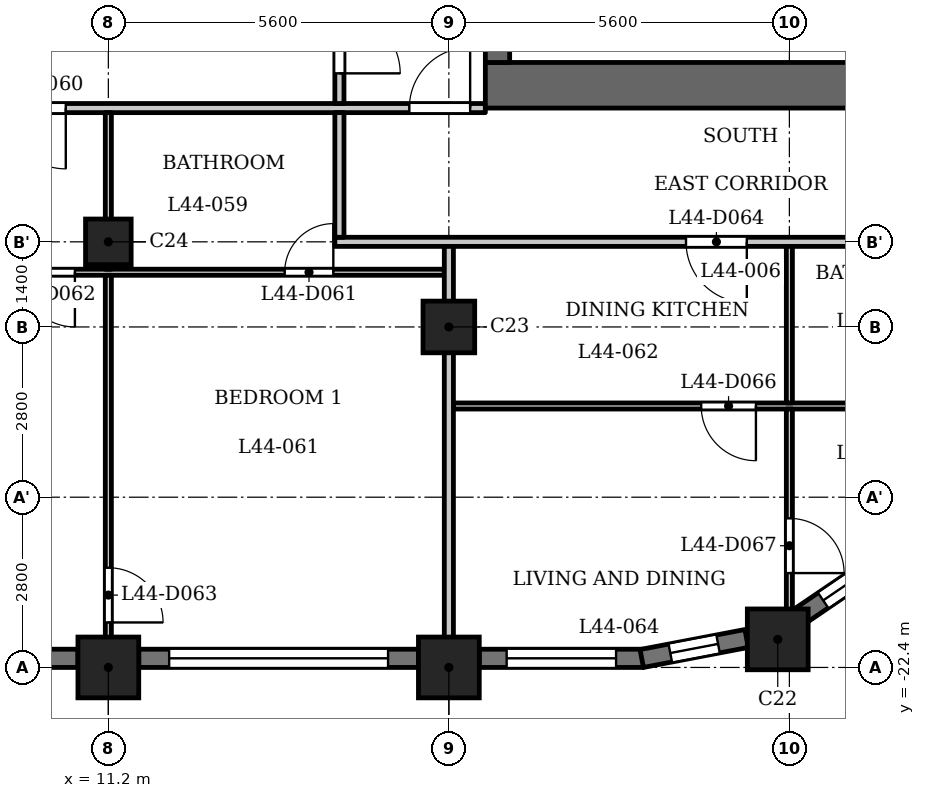
"""IFC4 building model, lengths in metres.
Left out: names, types, materials, properties, quantities, classifications, styles, units other than length and angle.
Written with IfcOpenShell. Run it as: python <this file> out.ifc"""

import sys

from ifc_helpers import new_model, si_unit, direction, frame, frame_2d, origin, origin_2d, place, context, subcontext, project, spatial, rectangle, extrude, element, fill, save


model = new_model("IFC4")
c1 = context("Model", 3, precision=1e-05, world=origin(), true_north=direction((0.0, 1.0)))
c2 = subcontext(c1, "Body", "Model", "MODEL_VIEW")
j1 = project(units=[si_unit("LENGTHUNIT", "METRE"), si_unit("PLANEANGLEUNIT", "RADIAN")], contexts=[c1])
p1 = place(None, origin())
s1 = spatial("IfcSite", under=j1, at=p1, CompositionType="ELEMENT")
p2 = place(p1, origin())
s2 = spatial("IfcBuilding", under=s1, at=p2, CompositionType="ELEMENT")
p3 = place(p2, frame((0.0, 0.0, 171.1)))
s3 = spatial("IfcBuildingStorey", under=s2, at=p3, CompositionType="ELEMENT", Elevation=171.1)
for number, where, z_axis, x_axis in (
    (1, (11.2, -22.4, 0.0), (0.0, 0.0, 1.0), (1.0, 0.0, 0.0)),
    (2, (16.8, -22.4, 0.0), (0.0, 0.0, 1.0), (1.0, 0.0, 0.0)),
    (3, (22.209, -21.938, 0.0), (0.0, 0.0, 1.0), (1.0, 0.0, 0.0)),
):
    element("IfcColumn", number, at=place(p3, frame(where, z_axis=z_axis, x_axis=x_axis)), inside=s3, PredefinedType="COLUMN", context=c2, shape_type="SweptSolid", body=[
        extrude(rectangle(XDim=1.0, YDim=1.0, at=origin_2d()), origin(), (0.0, 0.0, 1.0), 3.5),
    ])
p4 = place(p3, frame((16.8, -16.8, 0.0), z_axis=(0.0, 0.0, 1.0), x_axis=(1.0, 0.0, 0.0)))
e4 = element("IfcColumn", 4, at=p4, inside=s3, PredefinedType="COLUMN", context=c2, shape_type="SweptSolid", body=[
    extrude(rectangle(XDim=0.85, YDim=0.85, at=origin_2d()), origin(), (0.0, 0.0, 1.0), 3.5),
])
p5 = place(p3, frame((11.2, -15.4, 0.0), z_axis=(0.0, 0.0, 1.0), x_axis=(1.0, 0.0, 0.0)))
e5 = element("IfcColumn", 5, at=p5, inside=s3, PredefinedType="COLUMN", context=c2, shape_type="SweptSolid", body=[
    extrude(rectangle(XDim=0.75, YDim=0.75, at=origin_2d()), origin(), (0.0, 0.0, 1.0), 3.5),
])
p6 = place(p3, frame((6.1, -22.25, 0.0), z_axis=(0.0, 0.0, 1.0), x_axis=(1.0, 0.0, 0.0)))
e6 = element("IfcWall", 6, at=p6, inside=s3, PredefinedType="SOLIDWALL", context=c2, shape_type="SweptSolid", body=[
    extrude(rectangle(XDim=4.6, YDim=0.3, at=frame_2d((2.3, 0.0))), origin(), (0.0, 0.0, 1.0), 2.45),
])
p7 = place(p6, frame((0.5, 0.0, 1.2)))
e7 = element("IfcOpeningElement", 7, at=p7, cuts=e6, PredefinedType="OPENING", context=c2, shape_type="SweptSolid", body=[
    extrude(rectangle(XDim=3.6, YDim=0.95, at=frame_2d((1.8, 0.475))), frame((0.0, 0.16, 0.0), z_axis=(0.0, -1.0, 0.0), x_axis=(1.0, 0.0, 0.0)), (0.0, 0.0, 1.0), 0.32),
])
p8 = place(p3, frame((11.7, -22.25, 0.0), z_axis=(0.0, 0.0, 1.0), x_axis=(1.0, 0.0, 0.0)))
e8 = element("IfcWall", 8, at=p8, inside=s3, PredefinedType="SOLIDWALL", context=c2, shape_type="SweptSolid", body=[
    extrude(rectangle(XDim=4.6, YDim=0.3, at=frame_2d((2.3, 0.0))), origin(), (0.0, 0.0, 1.0), 2.45),
])
p9 = place(p8, frame((0.5, 0.0, 1.2)))
e9 = element("IfcOpeningElement", 9, at=p9, cuts=e8, PredefinedType="OPENING", context=c2, shape_type="SweptSolid", body=[
    extrude(rectangle(XDim=3.6, YDim=0.95, at=frame_2d((1.8, 0.475))), frame((0.0, 0.16, 0.0), z_axis=(0.0, -1.0, 0.0), x_axis=(1.0, 0.0, 0.0)), (0.0, 0.0, 1.0), 0.32),
])
p10 = place(p3, frame((17.3, -22.25, 0.0), z_axis=(0.0, 0.0, 1.0), x_axis=(1.0, 0.0, 0.0)))
e10 = element("IfcWall", 10, at=p10, inside=s3, PredefinedType="SOLIDWALL", context=c2, shape_type="SweptSolid", body=[
    extrude(rectangle(XDim=2.7, YDim=0.3, at=frame_2d((1.35, 0.0))), origin(), (0.0, 0.0, 1.0), 2.45),
])
p11 = place(p10, frame((0.45, 0.0, 0.9)))
e11 = element("IfcOpeningElement", 11, at=p11, cuts=e10, PredefinedType="OPENING", context=c2, shape_type="SweptSolid", body=[
    extrude(rectangle(XDim=1.8, YDim=1.25, at=frame_2d((0.9, 0.625))), frame((0.0, 0.16, 0.0), z_axis=(0.0, -1.0, 0.0), x_axis=(1.0, 0.0, 0.0)), (0.0, 0.0, 1.0), 0.32),
])
p12 = place(p3, frame((19.972, -22.253, 0.0), z_axis=(0.0, 0.0, 1.0), x_axis=(0.982284988433, 0.187393173565, 0.0)))
e12 = element("IfcWall", 12, at=p12, inside=s3, PredefinedType="SOLIDWALL", context=c2, shape_type="SweptSolid", body=[
    extrude(rectangle(XDim=1.756, YDim=0.3, at=frame_2d((0.878, 0.0))), origin(), (0.0, 0.0, 1.0), 2.45),
])
p13 = place(p12, frame((0.478, 0.0, 0.6)))
e13 = element("IfcOpeningElement", 13, at=p13, cuts=e12, PredefinedType="OPENING", context=c2, shape_type="SweptSolid", body=[
    extrude(rectangle(XDim=0.8, YDim=1.55, at=frame_2d((0.4, 0.775))), frame((0.0, 0.16, 0.0), z_axis=(0.0, -1.0, 0.0), x_axis=(1.0, 0.0, 0.0)), (0.0, 0.0, 1.0), 0.32),
])
p14 = place(p3, frame((22.56, -21.566, 0.0), z_axis=(0.0, 0.0, 1.0), x_axis=(0.82707645233, 0.562089443061, 0.0)))
e14 = element("IfcWall", 14, at=p14, inside=s3, PredefinedType="SOLIDWALL", context=c2, shape_type="SweptSolid", body=[
    extrude(rectangle(XDim=1.756, YDim=0.3, at=frame_2d((0.878, 0.0))), origin(), (0.0, 0.0, 1.0), 2.45),
])
p15 = place(p14, frame((0.478, 0.0, 0.6)))
e15 = element("IfcOpeningElement", 15, at=p15, cuts=e14, PredefinedType="OPENING", context=c2, shape_type="SweptSolid", body=[
    extrude(rectangle(XDim=0.8, YDim=1.55, at=frame_2d((0.4, 0.775))), frame((0.0, 0.16, 0.0), z_axis=(0.0, -1.0, 0.0), x_axis=(1.0, 0.0, 0.0)), (0.0, 0.0, 1.0), 0.32),
])
p16 = place(p3, frame((17.4, -12.825, 0.0), z_axis=(0.0, 0.0, 1.0), x_axis=(1.0, 0.0, 0.0)))
e16 = element("IfcWall", 16, at=p16, inside=s3, PredefinedType="SHEAR", context=c2, shape_type="SweptSolid", body=[
    extrude(rectangle(XDim=10.4, YDim=0.75, at=frame_2d((5.2, 0.0))), origin(), (0.0, 0.0, 1.0), 3.2),
])
p17 = place(p3, frame((17.6, -12.45, 0.0), z_axis=(0.0, 0.0, 1.0), x_axis=(0.0, 1.0, 0.0)))
e17 = element("IfcWall", 17, at=p17, inside=s3, PredefinedType="SHEAR", context=c2, shape_type="SweptSolid", body=[
    extrude(rectangle(XDim=24.9, YDim=0.4, at=frame_2d((12.45, 0.0))), origin(), (0.0, 0.0, 1.0), 3.2),
])
p18 = place(p17, frame((8.65, 0.0, 0.0)))
e18 = element("IfcOpeningElement", 18, at=p18, cuts=e17, PredefinedType="OPENING", context=c2, shape_type="SweptSolid", body=[
    extrude(rectangle(XDim=0.9, YDim=2.1, at=frame_2d((0.45, 1.05))), frame((0.0, 0.21, 0.0), z_axis=(0.0, -1.0, 0.0), x_axis=(1.0, 0.0, 0.0)), (0.0, 0.0, 1.0), 0.42),
])
p19 = place(p17, frame((15.6, 0.0, 0.0)))
e19 = element("IfcOpeningElement", 19, at=p19, cuts=e17, PredefinedType="OPENING", context=c2, shape_type="SweptSolid", body=[
    extrude(rectangle(XDim=1.1, YDim=2.1, at=frame_2d((0.55, 1.05))), frame((0.0, 0.21, 0.0), z_axis=(0.0, -1.0, 0.0), x_axis=(1.0, 0.0, 0.0)), (0.0, 0.0, 1.0), 0.42),
])
p20 = place(p17, frame((18.0, 0.0, 0.0)))
e20 = element("IfcOpeningElement", 20, at=p20, cuts=e17, PredefinedType="OPENING", context=c2, shape_type="SweptSolid", body=[
    extrude(rectangle(XDim=1.1, YDim=2.1, at=frame_2d((0.55, 1.05))), frame((0.0, 0.21, 0.0), z_axis=(0.0, -1.0, 0.0), x_axis=(1.0, 0.0, 0.0)), (0.0, 0.0, 1.0), 0.42),
])
p21 = place(p17, frame((23.025, 0.0, 0.0)))
e21 = element("IfcOpeningElement", 21, at=p21, cuts=e17, PredefinedType="OPENING", context=c2, shape_type="SweptSolid", body=[
    extrude(rectangle(XDim=1.1, YDim=2.1, at=frame_2d((0.55, 1.05))), frame((0.0, 0.21, 0.0), z_axis=(0.0, -1.0, 0.0), x_axis=(1.0, 0.0, 0.0)), (0.0, 0.0, 1.0), 0.42),
])
p22 = place(p17, frame((0.775, 0.0, 0.0)))
e22 = element("IfcOpeningElement", 22, at=p22, cuts=e17, PredefinedType="OPENING", context=c2, shape_type="SweptSolid", body=[
    extrude(rectangle(XDim=1.1, YDim=2.1, at=frame_2d((0.55, 1.05))), frame((0.0, 0.21, 0.0), z_axis=(0.0, -1.0, 0.0), x_axis=(1.0, 0.0, 0.0)), (0.0, 0.0, 1.0), 0.42),
])
p23 = place(p17, frame((12.925, 0.0, 0.0)))
e23 = element("IfcOpeningElement", 23, at=p23, cuts=e17, PredefinedType="OPENING", context=c2, shape_type="SweptSolid", body=[
    extrude(rectangle(XDim=1.8, YDim=2.1, at=frame_2d((0.9, 1.05))), frame((0.0, 0.21, 0.0), z_axis=(0.0, -1.0, 0.0), x_axis=(1.0, 0.0, 0.0)), (0.0, 0.0, 1.0), 0.42),
])
p24 = place(p3, frame((16.875, -18.1, 0.0), z_axis=(0.0, 0.0, 1.0), x_axis=(1.0, 0.0, 0.0)))
e24 = element("IfcWall", 24, at=p24, inside=s3, PredefinedType="PARTITIONING", context=c2, shape_type="SweptSolid", body=[
    extrude(rectangle(XDim=9.565, YDim=0.1, at=frame_2d((4.782, 0.0))), origin(), (0.0, 0.0, 1.0), 3.2),
])
p25 = place(p24, frame((7.639, 0.0, 0.0)))
e25 = element("IfcOpeningElement", 25, at=p25, cuts=e24, PredefinedType="OPENING", context=c2, shape_type="SweptSolid", body=[
    extrude(rectangle(XDim=0.8, YDim=2.1, at=frame_2d((0.4, 1.05))), frame((0.0, 0.06, 0.0), z_axis=(0.0, -1.0, 0.0), x_axis=(1.0, 0.0, 0.0)), (0.0, 0.0, 1.0), 0.12),
])
p26 = place(p24, frame((4.075, 0.0, 0.0)))
e26 = element("IfcOpeningElement", 26, at=p26, cuts=e24, PredefinedType="OPENING", context=c2, shape_type="SweptSolid", body=[
    extrude(rectangle(XDim=0.9, YDim=2.1, at=frame_2d((0.45, 1.05))), frame((0.0, 0.06, 0.0), z_axis=(0.0, -1.0, 0.0), x_axis=(1.0, 0.0, 0.0)), (0.0, 0.0, 1.0), 0.12),
])
p27 = place(p3, frame((-16.725, -15.9, 0.0), z_axis=(0.0, 0.0, 1.0), x_axis=(1.0, 0.0, 0.0)))
e27 = element("IfcWall", 27, at=p27, inside=s3, PredefinedType="PARTITIONING", context=c2, shape_type="SweptSolid", body=[
    extrude(rectangle(XDim=33.45, YDim=0.1, at=frame_2d((16.725, 0.0))), origin(), (0.0, 0.0, 1.0), 3.2),
])
p28 = place(p27, frame((9.675, 0.0, 0.0)))
e28 = element("IfcOpeningElement", 28, at=p28, cuts=e27, PredefinedType="OPENING", context=c2, shape_type="SweptSolid", body=[
    extrude(rectangle(XDim=0.8, YDim=2.1, at=frame_2d((0.4, 1.05))), frame((0.0, 0.06, 0.0), z_axis=(0.0, -1.0, 0.0), x_axis=(1.0, 0.0, 0.0)), (0.0, 0.0, 1.0), 0.12),
])
p29 = place(p27, frame((4.075, 0.0, 0.0)))
e29 = element("IfcOpeningElement", 29, at=p29, cuts=e27, PredefinedType="OPENING", context=c2, shape_type="SweptSolid", body=[
    extrude(rectangle(XDim=0.9, YDim=2.1, at=frame_2d((0.45, 1.05))), frame((0.0, 0.06, 0.0), z_axis=(0.0, -1.0, 0.0), x_axis=(1.0, 0.0, 0.0)), (0.0, 0.0, 1.0), 0.12),
])
p30 = place(p27, frame((20.875, 0.0, 0.0)))
e30 = element("IfcOpeningElement", 30, at=p30, cuts=e27, PredefinedType="OPENING", context=c2, shape_type="SweptSolid", body=[
    extrude(rectangle(XDim=0.8, YDim=2.1, at=frame_2d((0.4, 1.05))), frame((0.0, 0.06, 0.0), z_axis=(0.0, -1.0, 0.0), x_axis=(1.0, 0.0, 0.0)), (0.0, 0.0, 1.0), 0.12),
])
p31 = place(p27, frame((15.275, 0.0, 0.0)))
e31 = element("IfcOpeningElement", 31, at=p31, cuts=e27, PredefinedType="OPENING", context=c2, shape_type="SweptSolid", body=[
    extrude(rectangle(XDim=0.9, YDim=2.1, at=frame_2d((0.45, 1.05))), frame((0.0, 0.06, 0.0), z_axis=(0.0, -1.0, 0.0), x_axis=(1.0, 0.0, 0.0)), (0.0, 0.0, 1.0), 0.12),
])
p32 = place(p27, frame((30.825, 0.0, 0.0)))
e32 = element("IfcOpeningElement", 32, at=p32, cuts=e27, PredefinedType="OPENING", context=c2, shape_type="SweptSolid", body=[
    extrude(rectangle(XDim=0.8, YDim=2.1, at=frame_2d((0.4, 1.05))), frame((0.0, 0.06, 0.0), z_axis=(0.0, -1.0, 0.0), x_axis=(1.0, 0.0, 0.0)), (0.0, 0.0, 1.0), 0.12),
])
p33 = place(p27, frame((26.475, 0.0, 0.0)))
e33 = element("IfcOpeningElement", 33, at=p33, cuts=e27, PredefinedType="OPENING", context=c2, shape_type="SweptSolid", body=[
    extrude(rectangle(XDim=0.9, YDim=2.1, at=frame_2d((0.45, 1.05))), frame((0.0, 0.06, 0.0), z_axis=(0.0, -1.0, 0.0), x_axis=(1.0, 0.0, 0.0)), (0.0, 0.0, 1.0), 0.12),
])
p34 = place(p3, frame((14.925, -15.4, 0.0), z_axis=(0.0, 0.0, 1.0), x_axis=(1.0, 0.0, 0.0)))
e34 = element("IfcWall", 34, at=p34, inside=s3, PredefinedType="PARTITIONING", context=c2, shape_type="SweptSolid", body=[
    extrude(rectangle(XDim=12.559, YDim=0.15, at=frame_2d((6.279, 0.0))), origin(), (0.0, 0.0, 1.0), 3.2),
])
p35 = place(p34, frame((5.775, 0.0, 0.0)))
e35 = element("IfcOpeningElement", 35, at=p35, cuts=e34, PredefinedType="OPENING", context=c2, shape_type="SweptSolid", body=[
    extrude(rectangle(XDim=1.0, YDim=2.1, at=frame_2d((0.5, 1.05))), frame((0.0, 0.085, 0.0), z_axis=(0.0, -1.0, 0.0), x_axis=(1.0, 0.0, 0.0)), (0.0, 0.0, 1.0), 0.17),
])
p36 = place(p3, frame((-17.4, -13.2, 0.0), z_axis=(0.0, 0.0, 1.0), x_axis=(1.0, 0.0, 0.0)))
e36 = element("IfcWall", 36, at=p36, inside=s3, PredefinedType="PARTITIONING", context=c2, shape_type="SweptSolid", body=[
    extrude(rectangle(XDim=34.8, YDim=0.15, at=frame_2d((17.4, 0.0))), origin(), (0.0, 0.0, 1.0), 3.2),
])
p37 = place(p36, frame((0.15, 0.0, 0.0)))
e37 = element("IfcOpeningElement", 37, at=p37, cuts=e36, PredefinedType="OPENING", context=c2, shape_type="SweptSolid", body=[
    extrude(rectangle(XDim=1.0, YDim=2.1, at=frame_2d((0.5, 1.05))), frame((0.0, 0.085, 0.0), z_axis=(0.0, -1.0, 0.0), x_axis=(1.0, 0.0, 0.0)), (0.0, 0.0, 1.0), 0.17),
])
p38 = place(p36, frame((33.55, 0.0, 0.0)))
e38 = element("IfcOpeningElement", 38, at=p38, cuts=e36, PredefinedType="OPENING", context=c2, shape_type="SweptSolid", body=[
    extrude(rectangle(XDim=1.0, YDim=2.1, at=frame_2d((0.5, 1.05))), frame((0.0, 0.085, 0.0), z_axis=(0.0, -1.0, 0.0), x_axis=(1.0, 0.0, 0.0)), (0.0, 0.0, 1.0), 0.17),
])
p39 = place(p36, frame((15.7, 0.0, 0.0)))
e39 = element("IfcOpeningElement", 39, at=p39, cuts=e36, PredefinedType="OPENING", context=c2, shape_type="SweptSolid", body=[
    extrude(rectangle(XDim=1.0, YDim=2.1, at=frame_2d((0.5, 1.05))), frame((0.0, 0.085, 0.0), z_axis=(0.0, -1.0, 0.0), x_axis=(1.0, 0.0, 0.0)), (0.0, 0.0, 1.0), 0.17),
])
p40 = place(p36, frame((26.9, 0.0, 0.0)))
e40 = element("IfcOpeningElement", 40, at=p40, cuts=e36, PredefinedType="OPENING", context=c2, shape_type="SweptSolid", body=[
    extrude(rectangle(XDim=1.0, YDim=2.1, at=frame_2d((0.5, 1.05))), frame((0.0, 0.085, 0.0), z_axis=(0.0, -1.0, 0.0), x_axis=(1.0, 0.0, 0.0)), (0.0, 0.0, 1.0), 0.17),
])
p41 = place(p3, frame((11.2, -22.88, 0.0), z_axis=(0.0, 0.0, 1.0), x_axis=(0.0, 1.0, 0.0)))
e41 = element("IfcWall", 41, at=p41, inside=s3, PredefinedType="PARTITIONING", context=c2, shape_type="SweptSolid", body=[
    extrude(rectangle(XDim=6.93, YDim=0.1, at=frame_2d((3.465, 0.0))), origin(), (0.0, 0.0, 1.0), 3.2),
])
p42 = place(p41, frame((1.22, 0.0, 0.0)))
e42 = element("IfcOpeningElement", 42, at=p42, cuts=e41, PredefinedType="OPENING", context=c2, shape_type="SweptSolid", body=[
    extrude(rectangle(XDim=0.9, YDim=2.1, at=frame_2d((0.45, 1.05))), frame((0.0, 0.06, 0.0), z_axis=(0.0, -1.0, 0.0), x_axis=(1.0, 0.0, 0.0)), (0.0, 0.0, 1.0), 0.12),
])
p43 = place(p3, frame((11.2, -15.85, 0.0), z_axis=(0.0, 0.0, 1.0), x_axis=(0.0, 1.0, 0.0)))
e43 = element("IfcWall", 43, at=p43, inside=s3, PredefinedType="PARTITIONING", context=c2, shape_type="SweptSolid", body=[
    extrude(rectangle(XDim=2.575, YDim=0.1, at=frame_2d((1.288, 0.0))), origin(), (0.0, 0.0, 1.0), 3.2),
])
p44 = place(p3, frame((15.0, -15.325, 0.0), z_axis=(0.0, 0.0, 1.0), x_axis=(0.0, 1.0, 0.0)))
e44 = element("IfcWall", 44, at=p44, inside=s3, PredefinedType="PARTITIONING", context=c2, shape_type="SweptSolid", body=[
    extrude(rectangle(XDim=2.05, YDim=0.15, at=frame_2d((1.025, 0.0))), origin(), (0.0, 0.0, 1.0), 3.2),
])
p45 = place(p3, frame((15.0, -13.125, 0.0), z_axis=(0.0, 0.0, 1.0), x_axis=(0.0, 1.0, 0.0)))
e45 = element("IfcWall", 45, at=p45, inside=s3, PredefinedType="PARTITIONING", context=c2, shape_type="SweptSolid", body=[
    extrude(rectangle(XDim=6.356, YDim=0.15, at=frame_2d((3.178, 0.0))), origin(), (0.0, 0.0, 1.0), 3.2),
])
p46 = place(p45, frame((0.496, 0.0, 0.0)))
e46 = element("IfcOpeningElement", 46, at=p46, cuts=e45, PredefinedType="OPENING", context=c2, shape_type="SweptSolid", body=[
    extrude(rectangle(XDim=1.0, YDim=2.1, at=frame_2d((0.5, 1.05))), frame((0.0, 0.085, 0.0), z_axis=(0.0, -1.0, 0.0), x_axis=(1.0, 0.0, 0.0)), (0.0, 0.0, 1.0), 0.17),
])
p47 = place(p3, frame((16.8, -22.88, 0.0), z_axis=(0.0, 0.0, 1.0), x_axis=(0.0, 1.0, 0.0)))
e47 = element("IfcWall", 47, at=p47, inside=s3, PredefinedType="PARTITIONING", context=c2, shape_type="SweptSolid", body=[
    extrude(rectangle(XDim=7.405, YDim=0.15, at=frame_2d((3.702, 0.0))), origin(), (0.0, 0.0, 1.0), 3.2),
])
p48 = place(p3, frame((22.4, -21.72, 0.0), z_axis=(0.0, 0.0, 1.0), x_axis=(0.0, 1.0, 0.0)))
e48 = element("IfcWall", 48, at=p48, inside=s3, PredefinedType="PARTITIONING", context=c2, shape_type="SweptSolid", body=[
    extrude(rectangle(XDim=3.57, YDim=0.1, at=frame_2d((1.785, 0.0))), origin(), (0.0, 0.0, 1.0), 3.2),
])
p49 = place(p48, frame((0.872, 0.0, 0.0)))
e49 = element("IfcOpeningElement", 49, at=p49, cuts=e48, PredefinedType="OPENING", context=c2, shape_type="SweptSolid", body=[
    extrude(rectangle(XDim=0.9, YDim=2.1, at=frame_2d((0.45, 1.05))), frame((0.0, 0.06, 0.0), z_axis=(0.0, -1.0, 0.0), x_axis=(1.0, 0.0, 0.0)), (0.0, 0.0, 1.0), 0.12),
])
p50 = place(p3, frame((22.4, -18.05, 0.0), z_axis=(0.0, 0.0, 1.0), x_axis=(0.0, 1.0, 0.0)))
e50 = element("IfcWall", 50, at=p50, inside=s3, PredefinedType="PARTITIONING", context=c2, shape_type="SweptSolid", body=[
    extrude(rectangle(XDim=2.575, YDim=0.1, at=frame_2d((1.288, 0.0))), origin(), (0.0, 0.0, 1.0), 3.2),
])
p51 = place(p46, origin())
e51 = element("IfcDoor", 51, at=p51, inside=s3, OperationType="SINGLE_SWING_LEFT", PredefinedType="DOOR", context=c2, shape_type="SweptSolid", body=[
    extrude(rectangle(XDim=1.0, YDim=2.1, at=frame_2d((0.5, 1.05))), frame((0.0, 0.025, 0.0), z_axis=(0.0, -1.0, 0.0), x_axis=(1.0, 0.0, 0.0)), (0.0, 0.0, 1.0), 0.05),
])
fill(e46, e51)
p52 = place(p38, origin())
e52 = element("IfcDoor", 52, at=p52, inside=s3, OperationType="SINGLE_SWING_LEFT", PredefinedType="DOOR", context=c2, shape_type="SweptSolid", body=[
    extrude(rectangle(XDim=1.0, YDim=2.1, at=frame_2d((0.5, 1.05))), frame((0.0, 0.025, 0.0), z_axis=(0.0, -1.0, 0.0), x_axis=(1.0, 0.0, 0.0)), (0.0, 0.0, 1.0), 0.05),
])
fill(e38, e52)
p53 = place(p40, origin())
e53 = element("IfcDoor", 53, at=p53, inside=s3, OperationType="SINGLE_SWING_RIGHT", PredefinedType="DOOR", context=c2, shape_type="SweptSolid", body=[
    extrude(rectangle(XDim=1.0, YDim=2.1, at=frame_2d((0.5, 1.05))), frame((0.0, 0.025, 0.0), z_axis=(0.0, -1.0, 0.0), x_axis=(1.0, 0.0, 0.0)), (0.0, 0.0, 1.0), 0.05),
])
fill(e40, e53)
p54 = place(p32, origin())
e54 = element("IfcDoor", 54, at=p54, inside=s3, OperationType="SINGLE_SWING_LEFT", PredefinedType="DOOR", context=c2, shape_type="SweptSolid", body=[
    extrude(rectangle(XDim=0.8, YDim=2.1, at=frame_2d((0.4, 1.05))), frame((0.0, 0.025, 0.0), z_axis=(0.0, -1.0, 0.0), x_axis=(1.0, 0.0, 0.0)), (0.0, 0.0, 1.0), 0.05),
])
fill(e32, e54)
p55 = place(p33, origin())
e55 = element("IfcDoor", 55, at=p55, inside=s3, OperationType="SINGLE_SWING_RIGHT", PredefinedType="DOOR", context=c2, shape_type="SweptSolid", body=[
    extrude(rectangle(XDim=0.9, YDim=2.1, at=frame_2d((0.45, 1.05))), frame((0.0, 0.025, 0.0), z_axis=(0.0, -1.0, 0.0), x_axis=(1.0, 0.0, 0.0)), (0.0, 0.0, 1.0), 0.05),
])
fill(e33, e55)
p56 = place(p42, origin())
e56 = element("IfcDoor", 56, at=p56, inside=s3, OperationType="SINGLE_SWING_LEFT", PredefinedType="DOOR", context=c2, shape_type="SweptSolid", body=[
    extrude(rectangle(XDim=0.9, YDim=2.1, at=frame_2d((0.45, 1.05))), frame((0.0, 0.025, 0.0), z_axis=(0.0, -1.0, 0.0), x_axis=(1.0, 0.0, 0.0)), (0.0, 0.0, 1.0), 0.05),
])
fill(e42, e56)
p57 = place(p35, origin())
e57 = element("IfcDoor", 57, at=p57, inside=s3, OperationType="SINGLE_SWING_RIGHT", PredefinedType="DOOR", context=c2, shape_type="SweptSolid", body=[
    extrude(rectangle(XDim=1.0, YDim=2.1, at=frame_2d((0.5, 1.05))), frame((0.0, 0.025, 0.0), z_axis=(0.0, -1.0, 0.0), x_axis=(1.0, 0.0, 0.0)), (0.0, 0.0, 1.0), 0.05),
])
fill(e35, e57)
p58 = place(p26, origin())
e58 = element("IfcDoor", 58, at=p58, inside=s3, OperationType="SINGLE_SWING_RIGHT", PredefinedType="DOOR", context=c2, shape_type="SweptSolid", body=[
    extrude(rectangle(XDim=0.9, YDim=2.1, at=frame_2d((0.45, 1.05))), frame((0.0, 0.025, 0.0), z_axis=(0.0, -1.0, 0.0), x_axis=(1.0, 0.0, 0.0)), (0.0, 0.0, 1.0), 0.05),
])
fill(e26, e58)
p59 = place(p49, origin())
e59 = element("IfcDoor", 59, at=p59, inside=s3, OperationType="SINGLE_SWING_LEFT", PredefinedType="DOOR", context=c2, shape_type="SweptSolid", body=[
    extrude(rectangle(XDim=0.9, YDim=2.1, at=frame_2d((0.45, 1.05))), frame((0.0, 0.025, 0.0), z_axis=(0.0, -1.0, 0.0), x_axis=(1.0, 0.0, 0.0)), (0.0, 0.0, 1.0), 0.05),
])
fill(e49, e59)
p60 = place(p9, origin())
e60 = element("IfcWindow", 60, at=p60, inside=s3, PartitioningType="SINGLE_PANEL", PredefinedType="WINDOW", context=c2, shape_type="SweptSolid", body=[
    extrude(rectangle(XDim=3.6, YDim=0.95, at=frame_2d((1.8, 0.475))), frame((0.0, 0.03, 0.0), z_axis=(0.0, -1.0, 0.0), x_axis=(1.0, 0.0, 0.0)), (0.0, 0.0, 1.0), 0.06),
])
fill(e9, e60)
p61 = place(p11, origin())
e61 = element("IfcWindow", 61, at=p61, inside=s3, PartitioningType="SINGLE_PANEL", PredefinedType="WINDOW", context=c2, shape_type="SweptSolid", body=[
    extrude(rectangle(XDim=1.8, YDim=1.25, at=frame_2d((0.9, 0.625))), frame((0.0, 0.03, 0.0), z_axis=(0.0, -1.0, 0.0), x_axis=(1.0, 0.0, 0.0)), (0.0, 0.0, 1.0), 0.06),
])
fill(e11, e61)
p62 = place(p13, origin())
e62 = element("IfcWindow", 62, at=p62, inside=s3, PartitioningType="SINGLE_PANEL", PredefinedType="WINDOW", context=c2, shape_type="SweptSolid", body=[
    extrude(rectangle(XDim=0.8, YDim=1.55, at=frame_2d((0.4, 0.775))), frame((0.0, 0.03, 0.0), z_axis=(0.0, -1.0, 0.0), x_axis=(1.0, 0.0, 0.0)), (0.0, 0.0, 1.0), 0.06),
])
fill(e13, e62)
p63 = place(p15, origin())
e63 = element("IfcWindow", 63, at=p63, inside=s3, PartitioningType="SINGLE_PANEL", PredefinedType="WINDOW", context=c2, shape_type="SweptSolid", body=[
    extrude(rectangle(XDim=0.8, YDim=1.55, at=frame_2d((0.4, 0.775))), frame((0.0, 0.03, 0.0), z_axis=(0.0, -1.0, 0.0), x_axis=(1.0, 0.0, 0.0)), (0.0, 0.0, 1.0), 0.06),
])
fill(e15, e63)
save(model, sys.argv[1])
